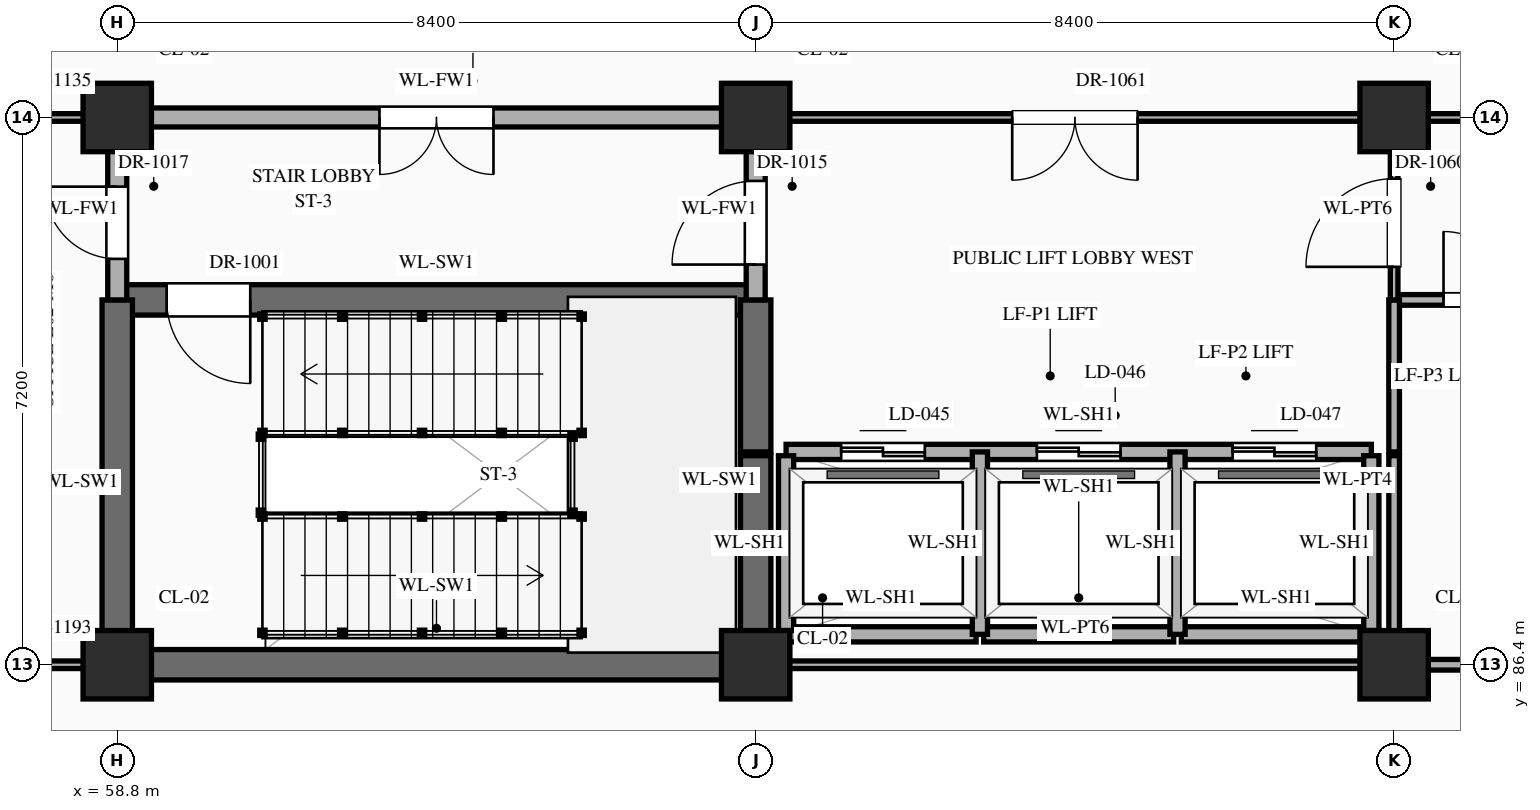
"""IFC4 building model, lengths in metres.
Left out: names, types, materials, properties, quantities, classifications, styles, units other than length and angle.
Written with IfcOpenShell. Run it as: python <this file> out.ifc"""

import sys

from ifc_helpers import new_model, si_unit, direction, frame, frame_2d, origin, origin_2d, place, context, subcontext, project, spatial, rectangle, extrude, element, fill, save


model = new_model("IFC4")
c1 = context("Model", 3, precision=1e-05, world=origin(), true_north=direction((0.0, 1.0)))
c2 = subcontext(c1, "Body", "Model", "MODEL_VIEW")
j1 = project(units=[si_unit("LENGTHUNIT", "METRE"), si_unit("PLANEANGLEUNIT", "RADIAN")], contexts=[c1])
p1 = place(None, origin())
s1 = spatial("IfcSite", under=j1, at=p1, CompositionType="ELEMENT")
p2 = place(p1, origin())
s2 = spatial("IfcBuilding", under=s1, at=p2, CompositionType="ELEMENT")
p3 = place(p2, frame((0.0, 0.0, 5.4)))
s3 = spatial("IfcBuildingStorey", under=s2, at=p3, CompositionType="ELEMENT", Elevation=5.4)
for number, where, z_axis, x_axis in (
    (1, (58.8, 86.4, 0.0), (0.0, 0.0, 1.0), (1.0, 0.0, 0.0)),
    (2, (58.8, 93.6, 0.0), (0.0, 0.0, 1.0), (1.0, 0.0, 0.0)),
    (3, (67.2, 86.4, 0.0), (0.0, 0.0, 1.0), (1.0, 0.0, 0.0)),
    (4, (67.2, 93.6, 0.0), (0.0, 0.0, 1.0), (1.0, 0.0, 0.0)),
    (5, (75.6, 86.4, 0.0), (0.0, 0.0, 1.0), (1.0, 0.0, 0.0)),
    (6, (75.6, 93.6, 0.0), (0.0, 0.0, 1.0), (1.0, 0.0, 0.0)),
):
    element("IfcColumn", number, at=place(p3, frame(where, z_axis=z_axis, x_axis=x_axis)), inside=s3, PredefinedType="COLUMN", context=c2, shape_type="SweptSolid", body=[
        extrude(rectangle(XDim=0.9, YDim=0.9, at=origin_2d()), origin(), (0.0, 0.0, 1.0), 5.4),
    ])
p4 = place(p3, frame((50.4, 86.4, 0.0), z_axis=(0.0, 0.0, 1.0), x_axis=(1.0, 0.0, 0.0)))
e7 = element("IfcWall", 7, at=p4, inside=s3, PredefinedType="STANDARD", context=c2, shape_type="SweptSolid", body=[
    extrude(rectangle(XDim=8.4, YDim=0.1, at=frame_2d((4.2, 0.0))), origin(), (0.0, 0.0, 1.0), 4.27),
])
p5 = place(p4, frame((1.125, 0.0, 0.0)))
e8 = element("IfcOpeningElement", 8, at=p5, cuts=e7, PredefinedType="OPENING", context=c2, shape_type="SweptSolid", body=[
    extrude(rectangle(XDim=0.92, YDim=2.15, at=frame_2d((0.46, 1.075))), frame((0.0, 0.062, 0.0), z_axis=(0.0, -1.0, 0.0), x_axis=(1.0, 0.0, 0.0)), (0.0, 0.0, 1.0), 0.124),
])
p6 = place(p4, frame((3.7, 0.0, 0.0)))
e9 = element("IfcOpeningElement", 9, at=p6, cuts=e7, PredefinedType="OPENING", context=c2, shape_type="SweptSolid", body=[
    extrude(rectangle(XDim=1.0, YDim=2.25, at=frame_2d((0.5, 1.125))), frame((0.0, 0.062, 0.0), z_axis=(0.0, -1.0, 0.0), x_axis=(1.0, 0.0, 0.0)), (0.0, 0.0, 1.0), 0.124),
])
p7 = place(p4, frame((6.295, 0.0, 0.0)))
e10 = element("IfcOpeningElement", 10, at=p7, cuts=e7, PredefinedType="OPENING", context=c2, shape_type="SweptSolid", body=[
    extrude(rectangle(XDim=1.04, YDim=2.2, at=frame_2d((0.52, 1.1))), frame((0.0, 0.062, 0.0), z_axis=(0.0, -1.0, 0.0), x_axis=(1.0, 0.0, 0.0)), (0.0, 0.0, 1.0), 0.124),
])
p8 = place(p3, frame((58.8, 86.4, 0.0), z_axis=(0.0, 0.0, 1.0), x_axis=(1.0, 0.0, 0.0)))
e11 = element("IfcWall", 11, at=p8, inside=s3, PredefinedType="SHEAR", context=c2, shape_type="SweptSolid", body=[
    extrude(rectangle(XDim=8.4, YDim=0.4, at=frame_2d((4.2, 0.0))), origin(), (0.0, 0.0, 1.0), 5.12),
])
p9 = place(p3, frame((67.25, 86.4, 0.0), z_axis=(0.0, 0.0, 1.0), x_axis=(1.0, 0.0, 0.0)))
e12 = element("IfcWall", 12, at=p9, inside=s3, PredefinedType="STANDARD", context=c2, shape_type="SweptSolid", body=[
    extrude(rectangle(XDim=8.3, YDim=0.1, at=frame_2d((4.15, 0.0))), origin(), (0.0, 0.0, 1.0), 4.27),
])
p10 = place(p3, frame((75.6, 86.4, 0.0), z_axis=(0.0, 0.0, 1.0), x_axis=(1.0, 0.0, 0.0)))
e13 = element("IfcWall", 13, at=p10, inside=s3, PredefinedType="STANDARD", context=c2, shape_type="SweptSolid", body=[
    extrude(rectangle(XDim=8.4, YDim=0.14, at=frame_2d((4.2, 0.0))), origin(), (0.0, 0.0, 1.0), 4.27),
])
for number, where, z_axis, x_axis in (
    (14, (67.6, 86.8, 0.0), (0.0, 0.0, 1.0), (1.0, 0.0, 0.0)),
    (15, (70.2, 86.8, 0.0), (0.0, 0.0, 1.0), (1.0, 0.0, 0.0)),
    (16, (72.8, 86.8, 0.0), (0.0, 0.0, 1.0), (1.0, 0.0, 0.0)),
):
    element("IfcWall", number, at=place(p3, frame(where, z_axis=z_axis, x_axis=x_axis)), inside=s3, PredefinedType="STANDARD", context=c2, shape_type="SweptSolid", body=[
        extrude(rectangle(XDim=2.5, YDim=0.2, at=frame_2d((1.25, 0.0))), origin(), (0.0, 0.0, 1.0), 5.12),
    ])
p11 = place(p3, frame((67.6, 89.2, 0.0), z_axis=(0.0, 0.0, 1.0), x_axis=(1.0, 0.0, 0.0)))
e17 = element("IfcWall", 17, at=p11, inside=s3, PredefinedType="STANDARD", context=c2, shape_type="SweptSolid", body=[
    extrude(rectangle(XDim=7.7, YDim=0.2, at=frame_2d((3.85, 0.0))), origin(), (0.0, 0.0, 1.0), 5.12),
])
p12 = place(p11, frame((0.725, 0.0, 0.0)))
e18 = element("IfcOpeningElement", 18, at=p12, cuts=e17, PredefinedType="OPENING", context=c2, shape_type="SweptSolid", body=[
    extrude(rectangle(XDim=1.1, YDim=2.15, at=frame_2d((0.55, 1.075))), frame((0.0, 0.112, 0.0), z_axis=(0.0, -1.0, 0.0), x_axis=(1.0, 0.0, 0.0)), (0.0, 0.0, 1.0), 0.224),
])
p13 = place(p11, frame((3.3, 0.0, 0.0)))
e19 = element("IfcOpeningElement", 19, at=p13, cuts=e17, PredefinedType="OPENING", context=c2, shape_type="SweptSolid", body=[
    extrude(rectangle(XDim=1.1, YDim=2.15, at=frame_2d((0.55, 1.075))), frame((0.0, 0.112, 0.0), z_axis=(0.0, -1.0, 0.0), x_axis=(1.0, 0.0, 0.0)), (0.0, 0.0, 1.0), 0.224),
])
p14 = place(p11, frame((5.875, 0.0, 0.0)))
e20 = element("IfcOpeningElement", 20, at=p14, cuts=e17, PredefinedType="OPENING", context=c2, shape_type="SweptSolid", body=[
    extrude(rectangle(XDim=1.1, YDim=2.15, at=frame_2d((0.55, 1.075))), frame((0.0, 0.112, 0.0), z_axis=(0.0, -1.0, 0.0), x_axis=(1.0, 0.0, 0.0)), (0.0, 0.0, 1.0), 0.224),
])
p15 = place(p3, frame((58.8, 91.2, 0.0), z_axis=(0.0, 0.0, 1.0), x_axis=(1.0, 0.0, 0.0)))
e21 = element("IfcWall", 21, at=p15, inside=s3, PredefinedType="SHEAR", context=c2, shape_type="SweptSolid", body=[
    extrude(rectangle(XDim=8.4, YDim=0.4, at=frame_2d((4.2, 0.0))), origin(), (0.0, 0.0, 1.0), 5.12),
])
p16 = place(p15, frame((0.65, 0.0, 0.0)))
e22 = element("IfcOpeningElement", 22, at=p16, cuts=e21, PredefinedType="OPENING", context=c2, shape_type="SweptSolid", body=[
    extrude(rectangle(XDim=1.1, YDim=2.2, at=frame_2d((0.55, 1.1))), frame((0.0, 0.212, 0.0), z_axis=(0.0, -1.0, 0.0), x_axis=(1.0, 0.0, 0.0)), (0.0, 0.0, 1.0), 0.424),
])
p17 = place(p3, frame((75.6, 91.2, 0.0), z_axis=(0.0, 0.0, 1.0), x_axis=(1.0, 0.0, 0.0)))
e23 = element("IfcWall", 23, at=p17, inside=s3, PredefinedType="STANDARD", context=c2, shape_type="SweptSolid", body=[
    extrude(rectangle(XDim=8.4, YDim=0.14, at=frame_2d((4.2, 0.0))), origin(), (0.0, 0.0, 1.0), 5.12),
])
p18 = place(p17, frame((0.65, 0.0, 0.0)))
e24 = element("IfcOpeningElement", 24, at=p18, cuts=e23, PredefinedType="OPENING", context=c2, shape_type="SweptSolid", body=[
    extrude(rectangle(XDim=0.9, YDim=2.15, at=frame_2d((0.45, 1.075))), frame((0.0, 0.082, 0.0), z_axis=(0.0, -1.0, 0.0), x_axis=(1.0, 0.0, 0.0)), (0.0, 0.0, 1.0), 0.164),
])
p19 = place(p17, frame((3.22, 0.0, 0.0)))
e25 = element("IfcOpeningElement", 25, at=p19, cuts=e23, PredefinedType="OPENING", context=c2, shape_type="SweptSolid", body=[
    extrude(rectangle(XDim=0.86, YDim=2.1, at=frame_2d((0.43, 1.05))), frame((0.0, 0.082, 0.0), z_axis=(0.0, -1.0, 0.0), x_axis=(1.0, 0.0, 0.0)), (0.0, 0.0, 1.0), 0.164),
])
p20 = place(p17, frame((6.32, 0.0, 0.0)))
e26 = element("IfcOpeningElement", 26, at=p20, cuts=e23, PredefinedType="OPENING", context=c2, shape_type="SweptSolid", body=[
    extrude(rectangle(XDim=0.86, YDim=2.1, at=frame_2d((0.43, 1.05))), frame((0.0, 0.082, 0.0), z_axis=(0.0, -1.0, 0.0), x_axis=(1.0, 0.0, 0.0)), (0.0, 0.0, 1.0), 0.164),
])
p21 = place(p3, frame((50.4, 93.6, 0.0), z_axis=(0.0, 0.0, 1.0), x_axis=(1.0, 0.0, 0.0)))
e27 = element("IfcWall", 27, at=p21, inside=s3, PredefinedType="STANDARD", context=c2, shape_type="SweptSolid", body=[
    extrude(rectangle(XDim=8.4, YDim=0.1, at=frame_2d((4.2, 0.0))), origin(), (0.0, 0.0, 1.0), 4.27),
])
p22 = place(p21, frame((1.095, 0.0, 0.0)))
e28 = element("IfcOpeningElement", 28, at=p22, cuts=e27, PredefinedType="OPENING", context=c2, shape_type="SweptSolid", body=[
    extrude(rectangle(XDim=0.98, YDim=2.35, at=frame_2d((0.49, 1.175))), frame((0.0, 0.062, 0.0), z_axis=(0.0, -1.0, 0.0), x_axis=(1.0, 0.0, 0.0)), (0.0, 0.0, 1.0), 0.124),
])
p23 = place(p21, frame((3.69, 0.0, 0.0)))
e29 = element("IfcOpeningElement", 29, at=p23, cuts=e27, PredefinedType="OPENING", context=c2, shape_type="SweptSolid", body=[
    extrude(rectangle(XDim=1.02, YDim=2.4, at=frame_2d((0.51, 1.2))), frame((0.0, 0.062, 0.0), z_axis=(0.0, -1.0, 0.0), x_axis=(1.0, 0.0, 0.0)), (0.0, 0.0, 1.0), 0.124),
])
p24 = place(p21, frame((6.285, 0.0, 0.0)))
e30 = element("IfcOpeningElement", 30, at=p24, cuts=e27, PredefinedType="OPENING", context=c2, shape_type="SweptSolid", body=[
    extrude(rectangle(XDim=1.06, YDim=2.4, at=frame_2d((0.53, 1.2))), frame((0.0, 0.062, 0.0), z_axis=(0.0, -1.0, 0.0), x_axis=(1.0, 0.0, 0.0)), (0.0, 0.0, 1.0), 0.124),
])
p25 = place(p3, frame((58.8, 93.6, 0.0), z_axis=(0.0, 0.0, 1.0), x_axis=(1.0, 0.0, 0.0)))
e31 = element("IfcWall", 31, at=p25, inside=s3, PredefinedType="STANDARD", context=c2, shape_type="SweptSolid", body=[
    extrude(rectangle(XDim=8.4, YDim=0.25, at=frame_2d((4.2, 0.0))), origin(), (0.0, 0.0, 1.0), 4.27),
])
p26 = place(p25, frame((3.45, 0.0, 0.0)))
e32 = element("IfcOpeningElement", 32, at=p26, cuts=e31, PredefinedType="OPENING", context=c2, shape_type="SweptSolid", body=[
    extrude(rectangle(XDim=1.5, YDim=2.25, at=frame_2d((0.75, 1.125))), frame((0.0, 0.137, 0.0), z_axis=(0.0, -1.0, 0.0), x_axis=(1.0, 0.0, 0.0)), (0.0, 0.0, 1.0), 0.274),
])
p27 = place(p3, frame((67.2, 93.6, 0.0), z_axis=(0.0, 0.0, 1.0), x_axis=(1.0, 0.0, 0.0)))
e33 = element("IfcWall", 33, at=p27, inside=s3, PredefinedType="STANDARD", context=c2, shape_type="SweptSolid", body=[
    extrude(rectangle(XDim=33.6, YDim=0.1, at=frame_2d((16.8, 0.0))), origin(), (0.0, 0.0, 1.0), 4.27),
])
p28 = place(p27, frame((3.375, 0.0, 0.0)))
e34 = element("IfcOpeningElement", 34, at=p28, cuts=e33, PredefinedType="OPENING", context=c2, shape_type="SweptSolid", body=[
    extrude(rectangle(XDim=1.65, YDim=2.4, at=frame_2d((0.825, 1.2))), frame((0.0, 0.062, 0.0), z_axis=(0.0, -1.0, 0.0), x_axis=(1.0, 0.0, 0.0)), (0.0, 0.0, 1.0), 0.124),
])
p29 = place(p27, frame((28.625, 0.0, 0.0)))
e35 = element("IfcOpeningElement", 35, at=p29, cuts=e33, PredefinedType="OPENING", context=c2, shape_type="SweptSolid", body=[
    extrude(rectangle(XDim=1.55, YDim=2.35, at=frame_2d((0.775, 1.175))), frame((0.0, 0.062, 0.0), z_axis=(0.0, -1.0, 0.0), x_axis=(1.0, 0.0, 0.0)), (0.0, 0.0, 1.0), 0.124),
])
p30 = place(p27, frame((11.65, 0.0, 0.0)))
e36 = element("IfcOpeningElement", 36, at=p30, cuts=e33, PredefinedType="OPENING", context=c2, shape_type="SweptSolid", body=[
    extrude(rectangle(XDim=1.9, YDim=2.5, at=frame_2d((0.95, 1.25))), frame((0.0, 0.062, 0.0), z_axis=(0.0, -1.0, 0.0), x_axis=(1.0, 0.0, 0.0)), (0.0, 0.0, 1.0), 0.124),
])
p31 = place(p27, frame((17.885, 0.0, 0.0)))
e37 = element("IfcOpeningElement", 37, at=p31, cuts=e33, PredefinedType="OPENING", context=c2, shape_type="SweptSolid", body=[
    extrude(rectangle(XDim=1.0, YDim=2.25, at=frame_2d((0.5, 1.125))), frame((0.0, 0.062, 0.0), z_axis=(0.0, -1.0, 0.0), x_axis=(1.0, 0.0, 0.0)), (0.0, 0.0, 1.0), 0.124),
])
p32 = place(p27, frame((20.48, 0.0, 0.0)))
e38 = element("IfcOpeningElement", 38, at=p32, cuts=e33, PredefinedType="OPENING", context=c2, shape_type="SweptSolid", body=[
    extrude(rectangle(XDim=1.04, YDim=2.2, at=frame_2d((0.52, 1.1))), frame((0.0, 0.062, 0.0), z_axis=(0.0, -1.0, 0.0), x_axis=(1.0, 0.0, 0.0)), (0.0, 0.0, 1.0), 0.124),
])
p33 = place(p27, frame((23.075, 0.0, 0.0)))
e39 = element("IfcOpeningElement", 39, at=p33, cuts=e33, PredefinedType="OPENING", context=c2, shape_type="SweptSolid", body=[
    extrude(rectangle(XDim=1.08, YDim=2.25, at=frame_2d((0.54, 1.125))), frame((0.0, 0.062, 0.0), z_axis=(0.0, -1.0, 0.0), x_axis=(1.0, 0.0, 0.0)), (0.0, 0.0, 1.0), 0.124),
])
p34 = place(p3, frame((58.8, 86.4, 0.0), z_axis=(0.0, 0.0, 1.0), x_axis=(0.0, 1.0, 0.0)))
e40 = element("IfcWall", 40, at=p34, inside=s3, PredefinedType="SHEAR", context=c2, shape_type="SweptSolid", body=[
    extrude(rectangle(XDim=4.8, YDim=0.4, at=frame_2d((2.4, 0.0))), origin(), (0.0, 0.0, 1.0), 5.12),
])
p35 = place(p3, frame((58.8, 91.2, 0.0), z_axis=(0.0, 0.0, 1.0), x_axis=(0.0, 1.0, 0.0)))
e41 = element("IfcWall", 41, at=p35, inside=s3, PredefinedType="STANDARD", context=c2, shape_type="SweptSolid", body=[
    extrude(rectangle(XDim=2.4, YDim=0.25, at=frame_2d((1.2, 0.0))), origin(), (0.0, 0.0, 1.0), 4.37),
])
p36 = place(p35, frame((0.54, 0.0, 0.0)))
e42 = element("IfcOpeningElement", 42, at=p36, cuts=e41, PredefinedType="OPENING", context=c2, shape_type="SweptSolid", body=[
    extrude(rectangle(XDim=0.95, YDim=2.15, at=frame_2d((0.475, 1.075))), frame((0.0, 0.137, 0.0), z_axis=(0.0, -1.0, 0.0), x_axis=(1.0, 0.0, 0.0)), (0.0, 0.0, 1.0), 0.274),
])
p37 = place(p3, frame((67.2, 86.45, 0.0), z_axis=(0.0, 0.0, 1.0), x_axis=(0.0, 1.0, 0.0)))
e43 = element("IfcWall", 43, at=p37, inside=s3, PredefinedType="SHEAR", context=c2, shape_type="SweptSolid", body=[
    extrude(rectangle(XDim=2.7, YDim=0.4, at=frame_2d((1.35, 0.0))), origin(), (0.0, 0.0, 1.0), 5.12),
])
p38 = place(p3, frame((67.2, 89.2, 0.0), z_axis=(0.0, 0.0, 1.0), x_axis=(0.0, 1.0, 0.0)))
e44 = element("IfcWall", 44, at=p38, inside=s3, PredefinedType="SHEAR", context=c2, shape_type="SweptSolid", body=[
    extrude(rectangle(XDim=2.0, YDim=0.4, at=frame_2d((1.0, 0.0))), origin(), (0.0, 0.0, 1.0), 5.12),
])
p39 = place(p3, frame((67.2, 91.2, 0.0), z_axis=(0.0, 0.0, 1.0), x_axis=(0.0, 1.0, 0.0)))
e45 = element("IfcWall", 45, at=p39, inside=s3, PredefinedType="STANDARD", context=c2, shape_type="SweptSolid", body=[
    extrude(rectangle(XDim=2.4, YDim=0.25, at=frame_2d((1.2, 0.0))), origin(), (0.0, 0.0, 1.0), 4.37),
])
p40 = place(p39, frame((0.465, 0.0, 0.0)))
e46 = element("IfcOpeningElement", 46, at=p40, cuts=e45, PredefinedType="OPENING", context=c2, shape_type="SweptSolid", body=[
    extrude(rectangle(XDim=1.1, YDim=2.2, at=frame_2d((0.55, 1.1))), frame((0.0, 0.137, 0.0), z_axis=(0.0, -1.0, 0.0), x_axis=(1.0, 0.0, 0.0)), (0.0, 0.0, 1.0), 0.274),
])
p41 = place(p3, frame((67.6, 86.85, 0.0), z_axis=(0.0, 0.0, 1.0), x_axis=(0.0, 1.0, 0.0)))
e47 = element("IfcWall", 47, at=p41, inside=s3, PredefinedType="STANDARD", context=c2, shape_type="SweptSolid", body=[
    extrude(rectangle(XDim=2.3, YDim=0.2, at=frame_2d((1.15, 0.0))), origin(), (0.0, 0.0, 1.0), 5.12),
])
for number, where, z_axis, x_axis in (
    (48, (70.15, 86.8, 0.0), (0.0, 0.0, 1.0), (0.0, 1.0, 0.0)),
    (49, (72.75, 86.8, 0.0), (0.0, 0.0, 1.0), (0.0, 1.0, 0.0)),
):
    element("IfcWall", number, at=place(p3, frame(where, z_axis=z_axis, x_axis=x_axis)), inside=s3, PredefinedType="STANDARD", context=c2, shape_type="SweptSolid", body=[
        extrude(rectangle(XDim=2.4, YDim=0.2, at=frame_2d((1.2, 0.0))), origin(), (0.0, 0.0, 1.0), 5.12),
    ])
p42 = place(p3, frame((75.3, 86.85, 0.0), z_axis=(0.0, 0.0, 1.0), x_axis=(0.0, 1.0, 0.0)))
e50 = element("IfcWall", 50, at=p42, inside=s3, PredefinedType="STANDARD", context=c2, shape_type="SweptSolid", body=[
    extrude(rectangle(XDim=2.3, YDim=0.2, at=frame_2d((1.15, 0.0))), origin(), (0.0, 0.0, 1.0), 5.12),
])
p43 = place(p3, frame((75.6, 86.45, 0.0), z_axis=(0.0, 0.0, 1.0), x_axis=(0.0, 1.0, 0.0)))
e51 = element("IfcWall", 51, at=p43, inside=s3, PredefinedType="STANDARD", context=c2, shape_type="SweptSolid", body=[
    extrude(rectangle(XDim=2.7, YDim=0.14, at=frame_2d((1.35, 0.0))), origin(), (0.0, 0.0, 1.0), 4.37),
])
p44 = place(p3, frame((75.6, 89.2, 0.0), z_axis=(0.0, 0.0, 1.0), x_axis=(0.0, 1.0, 0.0)))
e52 = element("IfcWall", 52, at=p44, inside=s3, PredefinedType="STANDARD", context=c2, shape_type="SweptSolid", body=[
    extrude(rectangle(XDim=2.0, YDim=0.14, at=frame_2d((1.0, 0.0))), origin(), (0.0, 0.0, 1.0), 4.37),
])
p45 = place(p3, frame((75.6, 91.2, 0.0), z_axis=(0.0, 0.0, 1.0), x_axis=(0.0, 1.0, 0.0)))
e53 = element("IfcWall", 53, at=p45, inside=s3, PredefinedType="STANDARD", context=c2, shape_type="SweptSolid", body=[
    extrude(rectangle(XDim=2.4, YDim=0.1, at=frame_2d((1.2, 0.0))), origin(), (0.0, 0.0, 1.0), 4.37),
])
p46 = place(p45, frame((0.435, 0.0, 0.0)))
e54 = element("IfcOpeningElement", 54, at=p46, cuts=e53, PredefinedType="OPENING", context=c2, shape_type="SweptSolid", body=[
    extrude(rectangle(XDim=1.16, YDim=2.3, at=frame_2d((0.58, 1.15))), frame((0.0, 0.062, 0.0), z_axis=(0.0, -1.0, 0.0), x_axis=(1.0, 0.0, 0.0)), (0.0, 0.0, 1.0), 0.124),
])
p47 = place(p12, origin())
e55 = element("IfcDoor", 55, at=p47, inside=s3, OperationType="DOUBLE_DOOR_SLIDING", PredefinedType="DOOR", context=c2, shape_type="SweptSolid", body=[
    extrude(rectangle(XDim=1.1, YDim=2.15, at=frame_2d((0.55, 1.075))), frame((0.0, 0.025, 0.0), z_axis=(0.0, -1.0, 0.0), x_axis=(1.0, 0.0, 0.0)), (0.0, 0.0, 1.0), 0.05),
])
fill(e18, e55)
p48 = place(p13, origin())
e56 = element("IfcDoor", 56, at=p48, inside=s3, OperationType="DOUBLE_DOOR_SLIDING", PredefinedType="DOOR", context=c2, shape_type="SweptSolid", body=[
    extrude(rectangle(XDim=1.1, YDim=2.15, at=frame_2d((0.55, 1.075))), frame((0.0, 0.025, 0.0), z_axis=(0.0, -1.0, 0.0), x_axis=(1.0, 0.0, 0.0)), (0.0, 0.0, 1.0), 0.05),
])
fill(e19, e56)
p49 = place(p14, origin())
e57 = element("IfcDoor", 57, at=p49, inside=s3, OperationType="DOUBLE_DOOR_SLIDING", PredefinedType="DOOR", context=c2, shape_type="SweptSolid", body=[
    extrude(rectangle(XDim=1.1, YDim=2.15, at=frame_2d((0.55, 1.075))), frame((0.0, 0.025, 0.0), z_axis=(0.0, -1.0, 0.0), x_axis=(1.0, 0.0, 0.0)), (0.0, 0.0, 1.0), 0.05),
])
fill(e20, e57)
p50 = place(p16, frame((1.1, 0.0, 0.0), z_axis=(0.0, 0.0, 1.0), x_axis=(-1.0, 0.0, 0.0)))
e58 = element("IfcDoor", 58, at=p50, inside=s3, OperationType="SINGLE_SWING_LEFT", PredefinedType="DOOR", context=c2, shape_type="SweptSolid", body=[
    extrude(rectangle(XDim=1.1, YDim=2.2, at=frame_2d((0.55, 1.1))), frame((0.0, 0.025, 0.0), z_axis=(0.0, -1.0, 0.0), x_axis=(1.0, 0.0, 0.0)), (0.0, 0.0, 1.0), 0.05),
])
fill(e22, e58)
p51 = place(p40, origin())
e59 = element("IfcDoor", 59, at=p51, inside=s3, OperationType="SINGLE_SWING_LEFT", PredefinedType="DOOR", context=c2, shape_type="SweptSolid", body=[
    extrude(rectangle(XDim=1.1, YDim=2.2, at=frame_2d((0.55, 1.1))), frame((0.0, 0.025, 0.0), z_axis=(0.0, -1.0, 0.0), x_axis=(1.0, 0.0, 0.0)), (0.0, 0.0, 1.0), 0.05),
])
fill(e46, e59)
p52 = place(p26, frame((1.5, 0.0, 0.0), z_axis=(0.0, 0.0, 1.0), x_axis=(-1.0, 0.0, 0.0)))
e60 = element("IfcDoor", 60, at=p52, inside=s3, OperationType="DOUBLE_DOOR_SINGLE_SWING", PredefinedType="DOOR", context=c2, shape_type="SweptSolid", body=[
    extrude(rectangle(XDim=1.5, YDim=2.25, at=frame_2d((0.75, 1.125))), frame((0.0, 0.025, 0.0), z_axis=(0.0, -1.0, 0.0), x_axis=(1.0, 0.0, 0.0)), (0.0, 0.0, 1.0), 0.05),
])
fill(e32, e60)
p53 = place(p36, origin())
e61 = element("IfcDoor", 61, at=p53, inside=s3, OperationType="SINGLE_SWING_RIGHT", PredefinedType="DOOR", context=c2, shape_type="SweptSolid", body=[
    extrude(rectangle(XDim=0.95, YDim=2.15, at=frame_2d((0.475, 1.075))), frame((0.0, 0.025, 0.0), z_axis=(0.0, -1.0, 0.0), x_axis=(1.0, 0.0, 0.0)), (0.0, 0.0, 1.0), 0.05),
])
fill(e42, e61)
p54 = place(p46, origin())
e62 = element("IfcDoor", 62, at=p54, inside=s3, OperationType="SINGLE_SWING_LEFT", PredefinedType="DOOR", context=c2, shape_type="SweptSolid", body=[
    extrude(rectangle(XDim=1.16, YDim=2.3, at=frame_2d((0.58, 1.15))), frame((0.0, 0.025, 0.0), z_axis=(0.0, -1.0, 0.0), x_axis=(1.0, 0.0, 0.0)), (0.0, 0.0, 1.0), 0.05),
])
fill(e54, e62)
p55 = place(p28, frame((1.65, 0.0, 0.0), z_axis=(0.0, 0.0, 1.0), x_axis=(-1.0, 0.0, 0.0)))
e63 = element("IfcDoor", 63, at=p55, inside=s3, OperationType="DOUBLE_DOOR_SINGLE_SWING", PredefinedType="DOOR", context=c2, shape_type="SweptSolid", body=[
    extrude(rectangle(XDim=1.65, YDim=2.4, at=frame_2d((0.825, 1.2))), frame((0.0, 0.025, 0.0), z_axis=(0.0, -1.0, 0.0), x_axis=(1.0, 0.0, 0.0)), (0.0, 0.0, 1.0), 0.05),
])
fill(e34, e63)
p56 = place(p18, origin())
e64 = element("IfcDoor", 64, at=p56, inside=s3, OperationType="SINGLE_SWING_LEFT", PredefinedType="DOOR", context=c2, shape_type="SweptSolid", body=[
    extrude(rectangle(XDim=0.9, YDim=2.15, at=frame_2d((0.45, 1.075))), frame((0.0, 0.025, 0.0), z_axis=(0.0, -1.0, 0.0), x_axis=(1.0, 0.0, 0.0)), (0.0, 0.0, 1.0), 0.05),
])
fill(e24, e64)
save(model, sys.argv[1])
